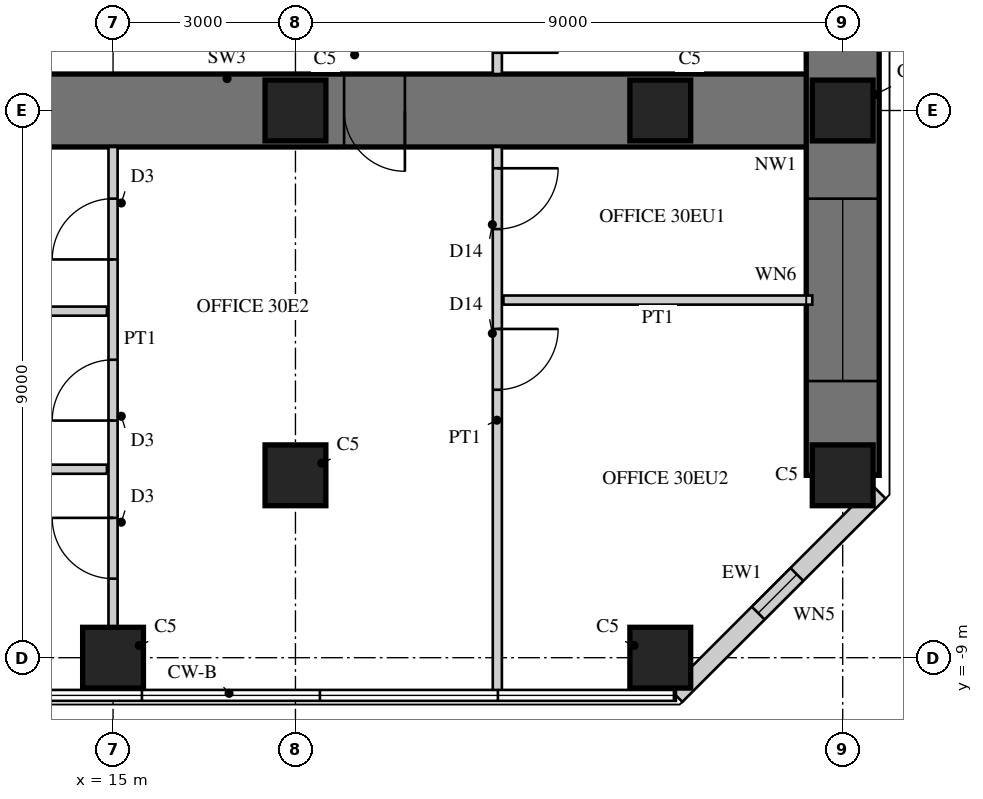
"""IFC4 building model, lengths in metres.
Left out: names, types, materials, properties, quantities, classifications, styles, units other than length and angle.
Written with IfcOpenShell. Run it as: python <this file> out.ifc"""

import sys

from ifc_helpers import new_model, si_unit, direction, frame, frame_2d, origin, origin_2d, place, context, subcontext, project, spatial, rectangle, hollow_rectangle, extrude, element, fill, save


model = new_model("IFC4")
c1 = context("Model", 3, precision=1e-05, world=origin(), true_north=direction((0.0, 1.0)))
c2 = subcontext(c1, "Body", "Model", "MODEL_VIEW")
j1 = project(units=[si_unit("LENGTHUNIT", "METRE"), si_unit("PLANEANGLEUNIT", "RADIAN")], contexts=[c1])
p1 = place(None, origin())
s1 = spatial("IfcSite", under=j1, at=p1, CompositionType="ELEMENT")
p2 = place(p1, origin())
s2 = spatial("IfcBuilding", under=s1, at=p2, CompositionType="ELEMENT")
p3 = place(p2, frame((0.0, 0.0, 124.5)))
s3 = spatial("IfcBuildingStorey", under=s2, at=p3, CompositionType="ELEMENT", Elevation=124.5)
p4 = place(p3, frame((9.0, 0.0, 0.0), z_axis=(0.0, 0.0, 1.0), x_axis=(1.0, 0.0, 0.0)))
e1 = element("IfcWall", 1, at=p4, inside=s3, PredefinedType="SHEAR", context=c2, shape_type="SweptSolid", body=[
    extrude(rectangle(XDim=18.0, YDim=1.2, at=frame_2d((9.0, 0.0))), origin(), (0.0, 0.0, 1.0), 4.0),
])
p5 = place(p4, frame((9.8, 0.0, 0.0)))
e2 = element("IfcOpeningElement", 2, at=p5, cuts=e1, PredefinedType="OPENING", context=c2, shape_type="SweptSolid", body=[
    extrude(rectangle(XDim=1.0, YDim=2.2, at=frame_2d((0.5, 1.1))), frame((0.0, 0.61, 0.0), z_axis=(0.0, -1.0, 0.0), x_axis=(1.0, 0.0, 0.0)), (0.0, 0.0, 1.0), 1.22),
])
p6 = place(p3, frame((27.0, -6.0, 0.0), z_axis=(0.0, 0.0, 1.0), x_axis=(0.0, 1.0, 0.0)))
e3 = element("IfcWall", 3, at=p6, inside=s3, PredefinedType="SHEAR", context=c2, shape_type="SweptSolid", body=[
    extrude(rectangle(XDim=12.0, YDim=1.2, at=frame_2d((6.0, 0.0))), origin(), (0.0, 0.0, 1.0), 4.0),
])
p7 = place(p6, frame((1.55, 0.0, 0.6)))
e4 = element("IfcOpeningElement", 4, at=p7, cuts=e3, PredefinedType="OPENING", context=c2, shape_type="SweptSolid", body=[
    extrude(rectangle(XDim=3.0, YDim=2.4, at=frame_2d((1.5, 1.2))), frame((0.0, 0.61, 0.0), z_axis=(0.0, -1.0, 0.0), x_axis=(1.0, 0.0, 0.0)), (0.0, 0.0, 1.0), 1.22),
])
p8 = place(p6, frame((7.45, 0.0, 0.6)))
e5 = element("IfcOpeningElement", 5, at=p8, cuts=e3, PredefinedType="OPENING", context=c2, shape_type="SweptSolid", body=[
    extrude(rectangle(XDim=3.0, YDim=2.4, at=frame_2d((1.5, 1.2))), frame((0.0, 0.61, 0.0), z_axis=(0.0, -1.0, 0.0), x_axis=(1.0, 0.0, 0.0)), (0.0, 0.0, 1.0), 1.22),
])
for number, where, z_axis, x_axis in (
    (6, (15.0, -9.0, 0.0), (0.0, 0.0, 1.0), (1.0, 0.0, 0.0)),
    (7, (24.0, -9.0, 0.0), (0.0, 0.0, 1.0), (1.0, 0.0, 0.0)),
    (8, (27.0, -6.0, 0.0), (0.0, 0.0, 1.0), (1.0, 0.0, 0.0)),
    (9, (27.0, 0.0, 0.0), (0.0, 0.0, 1.0), (1.0, 0.0, 0.0)),
    (10, (18.0, -6.0, 0.0), (0.0, 0.0, 1.0), (1.0, 0.0, 0.0)),
    (11, (18.0, 0.0, 0.0), (0.0, 0.0, 1.0), (1.0, 0.0, 0.0)),
    (12, (24.0, 0.0, 0.0), (0.0, 0.0, 1.0), (1.0, 0.0, 0.0)),
):
    element("IfcColumn", number, at=place(p3, frame(where, z_axis=z_axis, x_axis=x_axis)), inside=s3, PredefinedType="COLUMN", context=c2, shape_type="SweptSolid", body=[
        extrude(rectangle(XDim=1.0, YDim=1.0, at=origin_2d()), origin(), (0.0, 0.0, 1.0), 4.0),
    ])
p9 = place(p3, frame((24.257, -9.62, 0.0), z_axis=(0.0, 0.0, 1.0), x_axis=(0.707106781187, 0.707106781187, 0.0)))
e13 = element("IfcWall", 13, at=p9, inside=s3, PredefinedType="SOLIDWALL", context=c2, shape_type="SweptSolid", body=[
    extrude(rectangle(XDim=4.728, YDim=0.3, at=frame_2d((2.364, 0.0))), origin(), (0.0, 0.0, 1.0), 3.8),
])
p10 = place(p9, frame((1.914, 0.0, 0.3)))
e14 = element("IfcOpeningElement", 14, at=p10, cuts=e13, PredefinedType="OPENING", context=c2, shape_type="SweptSolid", body=[
    extrude(rectangle(XDim=0.9, YDim=2.4, at=frame_2d((0.45, 1.2))), frame((0.0, 0.16, 0.0), z_axis=(0.0, -1.0, 0.0), x_axis=(1.0, 0.0, 0.0)), (0.0, 0.0, 1.0), 0.32),
])
p11 = place(p3, frame((15.0, -8.5, 0.0), z_axis=(0.0, 0.0, 1.0), x_axis=(0.0, 1.0, 0.0)))
e15 = element("IfcWall", 15, at=p11, inside=s3, PredefinedType="PARTITIONING", context=c2, shape_type="SweptSolid", body=[
    extrude(rectangle(XDim=7.9, YDim=0.15, at=frame_2d((3.95, 0.0))), origin(), (0.0, 0.0, 1.0), 3.0),
])
p12 = place(p11, frame((0.8, 0.0, 0.0)))
e16 = element("IfcOpeningElement", 16, at=p12, cuts=e15, PredefinedType="OPENING", context=c2, shape_type="SweptSolid", body=[
    extrude(rectangle(XDim=1.0, YDim=2.1, at=frame_2d((0.5, 1.05))), frame((0.0, 0.085, 0.0), z_axis=(0.0, -1.0, 0.0), x_axis=(1.0, 0.0, 0.0)), (0.0, 0.0, 1.0), 0.17),
])
p13 = place(p11, frame((3.4, 0.0, 0.0)))
e17 = element("IfcOpeningElement", 17, at=p13, cuts=e15, PredefinedType="OPENING", context=c2, shape_type="SweptSolid", body=[
    extrude(rectangle(XDim=1.0, YDim=2.1, at=frame_2d((0.5, 1.05))), frame((0.0, 0.085, 0.0), z_axis=(0.0, -1.0, 0.0), x_axis=(1.0, 0.0, 0.0)), (0.0, 0.0, 1.0), 0.17),
])
p14 = place(p11, frame((6.05, 0.0, 0.0)))
e18 = element("IfcOpeningElement", 18, at=p14, cuts=e15, PredefinedType="OPENING", context=c2, shape_type="SweptSolid", body=[
    extrude(rectangle(XDim=1.0, YDim=2.1, at=frame_2d((0.5, 1.05))), frame((0.0, 0.085, 0.0), z_axis=(0.0, -1.0, 0.0), x_axis=(1.0, 0.0, 0.0)), (0.0, 0.0, 1.0), 0.17),
])
p15 = place(p3, frame((9.65, -3.3, 0.0), z_axis=(0.0, 0.0, 1.0), x_axis=(1.0, 0.0, 0.0)))
e19 = element("IfcWall", 19, at=p15, inside=s3, PredefinedType="PARTITIONING", context=c2, shape_type="SweptSolid", body=[
    extrude(rectangle(XDim=5.25, YDim=0.15, at=frame_2d((2.625, 0.0))), origin(), (0.0, 0.0, 1.0), 3.8),
])
p16 = place(p3, frame((9.65, -5.9, 0.0), z_axis=(0.0, 0.0, 1.0), x_axis=(1.0, 0.0, 0.0)))
e20 = element("IfcWall", 20, at=p16, inside=s3, PredefinedType="PARTITIONING", context=c2, shape_type="SweptSolid", body=[
    extrude(rectangle(XDim=5.25, YDim=0.15, at=frame_2d((2.625, 0.0))), origin(), (0.0, 0.0, 1.0), 3.1),
])
p17 = place(p3, frame((21.32, 0.6, 0.0), z_axis=(0.0, 0.0, 1.0), x_axis=(0.0, 1.0, 0.0)))
e21 = element("IfcWall", 21, at=p17, inside=s3, PredefinedType="PARTITIONING", context=c2, shape_type="SweptSolid", body=[
    extrude(rectangle(XDim=8.98, YDim=0.15, at=frame_2d((4.49, 0.0))), origin(), (0.0, 0.0, 1.0), 3.8),
])
p18 = place(p17, frame((0.35, 0.0, 0.0)))
e22 = element("IfcOpeningElement", 22, at=p18, cuts=e21, PredefinedType="OPENING", context=c2, shape_type="SweptSolid", body=[
    extrude(rectangle(XDim=1.0, YDim=2.2, at=frame_2d((0.5, 1.1))), frame((0.0, 0.085, 0.0), z_axis=(0.0, -1.0, 0.0), x_axis=(1.0, 0.0, 0.0)), (0.0, 0.0, 1.0), 0.17),
])
p19 = place(p17, frame((2.993, 0.0, 0.0)))
e23 = element("IfcOpeningElement", 23, at=p19, cuts=e21, PredefinedType="OPENING", context=c2, shape_type="SweptSolid", body=[
    extrude(rectangle(XDim=1.0, YDim=2.2, at=frame_2d((0.5, 1.1))), frame((0.0, 0.085, 0.0), z_axis=(0.0, -1.0, 0.0), x_axis=(1.0, 0.0, 0.0)), (0.0, 0.0, 1.0), 0.17),
])
p20 = place(p3, frame((21.42, -3.118, 0.0), z_axis=(0.0, 0.0, 1.0), x_axis=(1.0, 0.0, 0.0)))
e24 = element("IfcWall", 24, at=p20, inside=s3, PredefinedType="PARTITIONING", context=c2, shape_type="SweptSolid", body=[
    extrude(rectangle(XDim=5.08, YDim=0.15, at=frame_2d((2.54, 0.0))), origin(), (0.0, 0.0, 1.0), 3.8),
])
p21 = place(p3, frame((21.32, -9.58, 0.0), z_axis=(0.0, 0.0, 1.0), x_axis=(0.0, 1.0, 0.0)))
e25 = element("IfcWall", 25, at=p21, inside=s3, PredefinedType="PARTITIONING", context=c2, shape_type="SweptSolid", body=[
    extrude(rectangle(XDim=8.98, YDim=0.15, at=frame_2d((4.49, 0.0))), origin(), (0.0, 0.0, 1.0), 3.8),
])
p22 = place(p21, frame((4.987, 0.0, 0.0)))
e26 = element("IfcOpeningElement", 26, at=p22, cuts=e25, PredefinedType="OPENING", context=c2, shape_type="SweptSolid", body=[
    extrude(rectangle(XDim=1.0, YDim=2.2, at=frame_2d((0.5, 1.1))), frame((0.0, 0.085, 0.0), z_axis=(0.0, -1.0, 0.0), x_axis=(1.0, 0.0, 0.0)), (0.0, 0.0, 1.0), 0.17),
])
p23 = place(p21, frame((7.63, 0.0, 0.0)))
e27 = element("IfcOpeningElement", 27, at=p23, cuts=e25, PredefinedType="OPENING", context=c2, shape_type="SweptSolid", body=[
    extrude(rectangle(XDim=1.0, YDim=2.2, at=frame_2d((0.5, 1.1))), frame((0.0, 0.085, 0.0), z_axis=(0.0, -1.0, 0.0), x_axis=(1.0, 0.0, 0.0)), (0.0, 0.0, 1.0), 0.17),
])
p24 = place(p10, origin())
e28 = element("IfcWindow", 28, at=p24, inside=s3, PartitioningType="SINGLE_PANEL", PredefinedType="WINDOW", context=c2, shape_type="SweptSolid", body=[
    extrude(hollow_rectangle(XDim=0.9, YDim=2.4, WallThickness=0.06, at=frame_2d((0.45, 1.2))), frame((0.0, 0.03, 0.0), z_axis=(0.0, -1.0, 0.0), x_axis=(1.0, 0.0, 0.0)), (0.0, 0.0, 1.0), 0.06),
    extrude(rectangle(XDim=0.779, YDim=2.279, at=frame_2d((0.45, 1.2))), frame((0.0, 0.03, 0.0), z_axis=(0.0, -1.0, 0.0), x_axis=(1.0, 0.0, 0.0)), (0.0, 0.0, 1.0), 0.06),
])
fill(e14, e28)
p25 = place(p7, origin())
e29 = element("IfcWindow", 29, at=p25, inside=s3, PartitioningType="SINGLE_PANEL", PredefinedType="WINDOW", context=c2, shape_type="SweptSolid", body=[
    extrude(hollow_rectangle(XDim=3.0, YDim=2.4, WallThickness=0.06, at=frame_2d((1.5, 1.2))), frame((0.0, 0.03, 0.0), z_axis=(0.0, -1.0, 0.0), x_axis=(1.0, 0.0, 0.0)), (0.0, 0.0, 1.0), 0.06),
    extrude(rectangle(XDim=2.879, YDim=2.279, at=frame_2d((1.5, 1.2))), frame((0.0, 0.03, 0.0), z_axis=(0.0, -1.0, 0.0), x_axis=(1.0, 0.0, 0.0)), (0.0, 0.0, 1.0), 0.06),
])
fill(e4, e29)
p26 = place(p12, origin())
e30 = element("IfcDoor", 30, at=p26, inside=s3, OperationType="SINGLE_SWING_RIGHT", PredefinedType="DOOR", context=c2, shape_type="SweptSolid", body=[
    extrude(rectangle(XDim=1.0, YDim=2.1, at=frame_2d((0.5, 1.05))), frame((0.0, 0.025, 0.0), z_axis=(0.0, -1.0, 0.0), x_axis=(1.0, 0.0, 0.0)), (0.0, 0.0, 1.0), 0.05),
])
fill(e16, e30)
p27 = place(p13, origin())
e31 = element("IfcDoor", 31, at=p27, inside=s3, OperationType="SINGLE_SWING_LEFT", PredefinedType="DOOR", context=c2, shape_type="SweptSolid", body=[
    extrude(rectangle(XDim=1.0, YDim=2.1, at=frame_2d((0.5, 1.05))), frame((0.0, 0.025, 0.0), z_axis=(0.0, -1.0, 0.0), x_axis=(1.0, 0.0, 0.0)), (0.0, 0.0, 1.0), 0.05),
])
fill(e17, e31)
p28 = place(p14, origin())
e32 = element("IfcDoor", 32, at=p28, inside=s3, OperationType="SINGLE_SWING_LEFT", PredefinedType="DOOR", context=c2, shape_type="SweptSolid", body=[
    extrude(rectangle(XDim=1.0, YDim=2.1, at=frame_2d((0.5, 1.05))), frame((0.0, 0.025, 0.0), z_axis=(0.0, -1.0, 0.0), x_axis=(1.0, 0.0, 0.0)), (0.0, 0.0, 1.0), 0.05),
])
fill(e18, e32)
p29 = place(p18, frame((1.0, 0.0, 0.0), z_axis=(0.0, 0.0, 1.0), x_axis=(-1.0, 0.0, 0.0)))
e33 = element("IfcDoor", 33, at=p29, inside=s3, OperationType="SINGLE_SWING_RIGHT", PredefinedType="DOOR", context=c2, shape_type="SweptSolid", body=[
    extrude(rectangle(XDim=1.0, YDim=2.2, at=frame_2d((0.5, 1.1))), frame((0.0, 0.025, 0.0), z_axis=(0.0, -1.0, 0.0), x_axis=(1.0, 0.0, 0.0)), (0.0, 0.0, 1.0), 0.05),
])
fill(e22, e33)
p30 = place(p22, frame((1.0, 0.0, 0.0), z_axis=(0.0, 0.0, 1.0), x_axis=(-1.0, 0.0, 0.0)))
e34 = element("IfcDoor", 34, at=p30, inside=s3, OperationType="SINGLE_SWING_LEFT", PredefinedType="DOOR", context=c2, shape_type="SweptSolid", body=[
    extrude(rectangle(XDim=1.0, YDim=2.2, at=frame_2d((0.5, 1.1))), frame((0.0, 0.025, 0.0), z_axis=(0.0, -1.0, 0.0), x_axis=(1.0, 0.0, 0.0)), (0.0, 0.0, 1.0), 0.05),
])
fill(e26, e34)
p31 = place(p23, frame((1.0, 0.0, 0.0), z_axis=(0.0, 0.0, 1.0), x_axis=(-1.0, 0.0, 0.0)))
e35 = element("IfcDoor", 35, at=p31, inside=s3, OperationType="SINGLE_SWING_LEFT", PredefinedType="DOOR", context=c2, shape_type="SweptSolid", body=[
    extrude(rectangle(XDim=1.0, YDim=2.2, at=frame_2d((0.5, 1.1))), frame((0.0, 0.025, 0.0), z_axis=(0.0, -1.0, 0.0), x_axis=(1.0, 0.0, 0.0)), (0.0, 0.0, 1.0), 0.05),
])
fill(e27, e35)
p32 = place(p5, frame((1.0, 0.0, 0.0), z_axis=(0.0, 0.0, 1.0), x_axis=(-1.0, 0.0, 0.0)))
e36 = element("IfcDoor", 36, at=p32, inside=s3, OperationType="SINGLE_SWING_LEFT", PredefinedType="DOOR", context=c2, shape_type="SweptSolid", body=[
    extrude(rectangle(XDim=1.0, YDim=2.2, at=frame_2d((0.5, 1.1))), frame((0.0, 0.025, 0.0), z_axis=(0.0, -1.0, 0.0), x_axis=(1.0, 0.0, 0.0)), (0.0, 0.0, 1.0), 0.05),
])
fill(e2, e36)
save(model, sys.argv[1])
